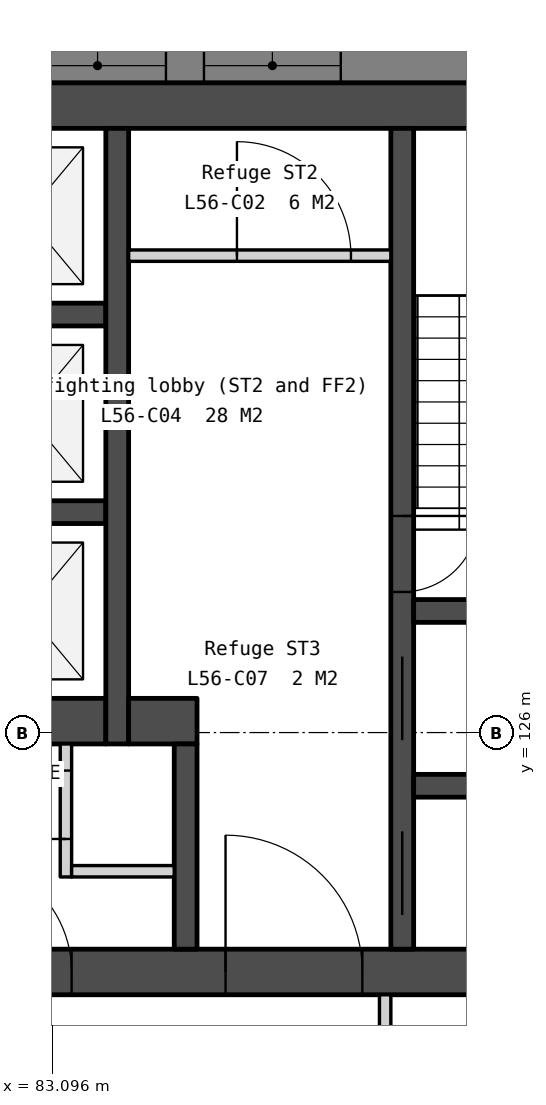
"""IFC4 building model, lengths in metres.
Left out: names, types, materials, properties, quantities, classifications, styles, units other than length and angle.
Written with IfcOpenShell. Run it as: python <this file> out.ifc"""

import sys

from ifc_helpers import new_model, si_unit, direction, frame, frame_2d, origin, place, context, subcontext, project, spatial, polyline, rectangle, outline, extrude, element, fill, save


model = new_model("IFC4")
c1 = context("Model", 3, precision=1e-05, world=origin(), true_north=direction((0.0, 1.0)))
c2 = subcontext(c1, "Body", "Model", "MODEL_VIEW")
j1 = project(units=[si_unit("LENGTHUNIT", "METRE"), si_unit("PLANEANGLEUNIT", "RADIAN")], contexts=[c1])
p1 = place(None, origin())
s1 = spatial("IfcSite", under=j1, at=p1, CompositionType="ELEMENT")
p2 = place(p1, origin())
s2 = spatial("IfcBuilding", under=s1, at=p2, CompositionType="ELEMENT")
p3 = place(p2, frame((0.0, 0.0, 223.1)))
s3 = spatial("IfcBuildingStorey", under=s2, at=p3, CompositionType="ELEMENT", Elevation=223.1)
p4 = place(p3, frame((69.0, 134.25, 0.0), z_axis=(0.0, 0.0, 1.0), x_axis=(1.0, 0.0, 0.0)))
e1 = element("IfcWall", 1, at=p4, inside=s3, PredefinedType="SOLIDWALL", context=c2, shape_type="SweptSolid", body=[
    extrude(rectangle(XDim=22.0, YDim=0.6, at=frame_2d((11.0, 0.0))), origin(), (0.0, 0.0, 1.0), 3.6),
])
p5 = place(p3, frame((69.0, 122.85, 0.0), z_axis=(0.0, 0.0, 1.0), x_axis=(1.0, 0.0, 0.0)))
e2 = element("IfcWall", 2, at=p5, inside=s3, PredefinedType="SOLIDWALL", context=c2, shape_type="SweptSolid", body=[
    extrude(rectangle(XDim=22.0, YDim=0.6, at=frame_2d((11.0, 0.0))), origin(), (0.0, 0.0, 1.0), 3.6),
])
p6 = place(p5, frame((16.375, 0.0, 0.0)))
e3 = element("IfcOpeningElement", 3, at=p6, cuts=e2, PredefinedType="OPENING", context=c2, shape_type="SweptSolid", body=[
    extrude(rectangle(XDim=1.8, YDim=2.1, at=frame_2d((0.9, 1.05))), frame((0.0, 0.31, 0.0), z_axis=(0.0, -1.0, 0.0), x_axis=(1.0, 0.0, 0.0)), (0.0, 0.0, 1.0), 0.62),
])
p7 = place(p5, frame((3.825, 0.0, 0.0)))
e4 = element("IfcOpeningElement", 4, at=p7, cuts=e2, PredefinedType="OPENING", context=c2, shape_type="SweptSolid", body=[
    extrude(rectangle(XDim=1.8, YDim=2.1, at=frame_2d((0.9, 1.05))), frame((0.0, 0.31, 0.0), z_axis=(0.0, -1.0, 0.0), x_axis=(1.0, 0.0, 0.0)), (0.0, 0.0, 1.0), 0.62),
])
p8 = place(p5, frame((12.85, 0.0, 0.0)))
e5 = element("IfcOpeningElement", 5, at=p8, cuts=e2, PredefinedType="OPENING", context=c2, shape_type="SweptSolid", body=[
    extrude(rectangle(XDim=1.5, YDim=2.1, at=frame_2d((0.75, 1.05))), frame((0.0, 0.31, 0.0), z_axis=(0.0, -1.0, 0.0), x_axis=(1.0, 0.0, 0.0)), (0.0, 0.0, 1.0), 0.62),
])
for number, where, z_axis, x_axis in (
    (6, (81.7, 131.5, 0.0), (0.0, 0.0, 1.0), (1.0, 0.0, 0.0)),
    (7, (81.7, 128.9, 0.0), (0.0, 0.0, 1.0), (1.0, 0.0, 0.0)),
):
    element("IfcWall", number, at=place(p3, frame(where, z_axis=z_axis, x_axis=x_axis)), inside=s3, PredefinedType="SOLIDWALL", context=c2, shape_type="SweptSolid", body=[
        extrude(rectangle(XDim=2.1, YDim=0.3, at=frame_2d((1.05, 0.0))), origin(), (0.0, 0.0, 1.0), 3.6),
    ])
p9 = place(p3, frame((82.9, 126.15, 0.0), z_axis=(0.0, 0.0, 1.0), x_axis=(1.0, 0.0, 0.0)))
e8 = element("IfcWall", 8, at=p9, inside=s3, PredefinedType="SOLIDWALL", context=c2, shape_type="SweptSolid", body=[
    extrude(rectangle(XDim=0.9, YDim=0.6, at=frame_2d((0.45, 0.0))), origin(), (0.0, 0.0, 1.0), 3.6),
])
p10 = place(p3, frame((83.275, 125.85, 0.0), z_axis=(0.0, 0.0, 1.0), x_axis=(0.0, -1.0, 0.0)))
e9 = element("IfcWall", 9, at=p10, inside=s3, PredefinedType="PARTITIONING", context=c2, shape_type="SweptSolid", body=[
    extrude(rectangle(XDim=1.75, YDim=0.15, at=frame_2d((0.875, 0.0))), origin(), (0.0, 0.0, 1.0), 3.6),
])
p11 = place(p10, frame((0.35, 0.0, 0.0)))
e10 = element("IfcOpeningElement", 10, at=p11, cuts=e9, PredefinedType="OPENING", context=c2, shape_type="SweptSolid", body=[
    extrude(rectangle(XDim=0.9, YDim=2.1, at=frame_2d((0.45, 1.05))), frame((0.0, 0.085, 0.0), z_axis=(0.0, -1.0, 0.0), x_axis=(1.0, 0.0, 0.0)), (0.0, 0.0, 1.0), 0.17),
])
p12 = place(p3, frame((83.35, 124.175, 0.0), z_axis=(0.0, 0.0, 1.0), x_axis=(1.0, 0.0, 0.0)))
e11 = element("IfcWall", 11, at=p12, inside=s3, PredefinedType="PARTITIONING", context=c2, shape_type="SweptSolid", body=[
    extrude(rectangle(XDim=1.35, YDim=0.15, at=frame_2d((0.675, 0.0))), origin(), (0.0, 0.0, 1.0), 3.6),
])
p13 = place(p3, frame((83.95, 133.95, 0.0), z_axis=(0.0, 0.0, 1.0), x_axis=(0.0, -1.0, 0.0)))
e12 = element("IfcWall", 12, at=p13, inside=s3, PredefinedType="SOLIDWALL", context=c2, shape_type="SweptSolid", body=[
    extrude(rectangle(XDim=8.1, YDim=0.3, at=frame_2d((4.05, 0.0))), origin(), (0.0, 0.0, 1.0), 3.6),
])
p14 = place(p3, frame((84.1, 132.275, 0.0), z_axis=(0.0, 0.0, 1.0), x_axis=(1.0, 0.0, 0.0)))
e13 = element("IfcWall", 13, at=p14, inside=s3, PredefinedType="PARTITIONING", context=c2, shape_type="SweptSolid", body=[
    extrude(rectangle(XDim=3.45, YDim=0.15, at=frame_2d((1.725, 0.0))), origin(), (0.0, 0.0, 1.0), 3.6),
])
p15 = place(p14, frame((1.425, 0.0, 0.0)))
e14 = element("IfcOpeningElement", 14, at=p15, cuts=e13, PredefinedType="OPENING", context=c2, shape_type="SweptSolid", body=[
    extrude(rectangle(XDim=1.5, YDim=2.1, at=frame_2d((0.75, 1.05))), frame((0.0, 0.085, 0.0), z_axis=(0.0, -1.0, 0.0), x_axis=(1.0, 0.0, 0.0)), (0.0, 0.0, 1.0), 0.17),
])
p16 = place(p3, frame((84.1, 126.15, 0.0), z_axis=(0.0, 0.0, 1.0), x_axis=(1.0, 0.0, 0.0)))
e15 = element("IfcWall", 15, at=p16, inside=s3, PredefinedType="SOLIDWALL", context=c2, shape_type="SweptSolid", body=[
    extrude(rectangle(XDim=0.9, YDim=0.6, at=frame_2d((0.45, 0.0))), origin(), (0.0, 0.0, 1.0), 3.6),
])
p17 = place(p3, frame((84.85, 125.85, 0.0), z_axis=(0.0, 0.0, 1.0), x_axis=(0.0, -1.0, 0.0)))
e16 = element("IfcWall", 16, at=p17, inside=s3, PredefinedType="SOLIDWALL", context=c2, shape_type="SweptSolid", body=[
    extrude(rectangle(XDim=2.7, YDim=0.3, at=frame_2d((1.35, 0.0))), origin(), (0.0, 0.0, 1.0), 3.6),
])
p18 = place(p3, frame((87.7, 133.95, 0.0), z_axis=(0.0, 0.0, 1.0), x_axis=(0.0, -1.0, 0.0)))
e17 = element("IfcWall", 17, at=p18, inside=s3, PredefinedType="SOLIDWALL", context=c2, shape_type="SweptSolid", body=[
    extrude(rectangle(XDim=10.8, YDim=0.3, at=frame_2d((5.4, 0.0))), origin(), (0.0, 0.0, 1.0), 3.6),
])
p19 = place(p18, frame((6.95, 0.0, 0.0)))
e18 = element("IfcOpeningElement", 18, at=p19, cuts=e17, PredefinedType="OPENING", context=c2, shape_type="SweptSolid", body=[
    extrude(rectangle(XDim=1.1, YDim=2.1, at=frame_2d((0.55, 1.05))), frame((0.0, 0.16, 0.0), z_axis=(0.0, -1.0, 0.0), x_axis=(1.0, 0.0, 0.0)), (0.0, 0.0, 1.0), 0.32),
])
p20 = place(p18, frame((5.1, 0.0, 0.0)))
e19 = element("IfcOpeningElement", 19, at=p20, cuts=e17, PredefinedType="OPENING", context=c2, shape_type="SweptSolid", body=[
    extrude(rectangle(XDim=1.0, YDim=2.1, at=frame_2d((0.5, 1.05))), frame((0.0, 0.16, 0.0), z_axis=(0.0, -1.0, 0.0), x_axis=(1.0, 0.0, 0.0)), (0.0, 0.0, 1.0), 0.32),
])
p21 = place(p18, frame((9.25, 0.0, 0.0)))
e20 = element("IfcOpeningElement", 20, at=p21, cuts=e17, PredefinedType="OPENING", context=c2, shape_type="SweptSolid", body=[
    extrude(rectangle(XDim=1.1, YDim=2.1, at=frame_2d((0.55, 1.05))), frame((0.0, 0.16, 0.0), z_axis=(0.0, -1.0, 0.0), x_axis=(1.0, 0.0, 0.0)), (0.0, 0.0, 1.0), 0.32),
])
for number, where, z_axis, x_axis in (
    (21, (87.85, 127.6, 0.0), (0.0, 0.0, 1.0), (1.0, 0.0, 0.0)),
    (22, (87.85, 125.3, 0.0), (0.0, 0.0, 1.0), (1.0, 0.0, 0.0)),
):
    element("IfcWall", number, at=place(p3, frame(where, z_axis=z_axis, x_axis=x_axis)), inside=s3, PredefinedType="SOLIDWALL", context=c2, shape_type="SweptSolid", body=[
        extrude(rectangle(XDim=2.55, YDim=0.3, at=frame_2d((1.275, 0.0))), origin(), (0.0, 0.0, 1.0), 3.6),
    ])
p22 = place(p3, frame((99.365, 134.775, -0.15), z_axis=(0.0, 0.0, 1.0), x_axis=(-1.0, 0.0, 0.0)))
e23 = element("IfcWall", 23, at=p22, inside=s3, PredefinedType="SOLIDWALL", context=c2, shape_type="SweptSolid", body=[
    extrude(outline(polyline([(38.729, 0.0), (38.729, 3.75), (0.0, 3.75), (0.0, 0.0), (38.729, 0.0)])), frame((0.0, 0.225, 0.0), z_axis=(0.0, -1.0, 0.0), x_axis=(1.0, 0.0, 0.0)), (0.0, 0.0, 1.0), 0.45),
])
p23 = place(p22, frame((2.791, 0.0, 0.95)))
e24 = element("IfcOpeningElement", 24, at=p23, cuts=e23, PredefinedType="OPENING", context=c2, shape_type="SweptSolid", body=[
    extrude(rectangle(XDim=1.8, YDim=2.2, at=frame_2d((0.9, 1.1))), frame((0.0, 0.235, 0.0), z_axis=(0.0, -1.0, 0.0), x_axis=(1.0, 0.0, 0.0)), (0.0, 0.0, 1.0), 0.47),
])
p24 = place(p22, frame((5.091, 0.0, 0.95)))
e25 = element("IfcOpeningElement", 25, at=p24, cuts=e23, PredefinedType="OPENING", context=c2, shape_type="SweptSolid", body=[
    extrude(rectangle(XDim=1.8, YDim=2.2, at=frame_2d((0.9, 1.1))), frame((0.0, 0.235, 0.0), z_axis=(0.0, -1.0, 0.0), x_axis=(1.0, 0.0, 0.0)), (0.0, 0.0, 1.0), 0.47),
])
p25 = place(p22, frame((12.473, 0.0, 0.95)))
e26 = element("IfcOpeningElement", 26, at=p25, cuts=e23, PredefinedType="OPENING", context=c2, shape_type="SweptSolid", body=[
    extrude(rectangle(XDim=1.8, YDim=2.2, at=frame_2d((0.9, 1.1))), frame((0.0, 0.235, 0.0), z_axis=(0.0, -1.0, 0.0), x_axis=(1.0, 0.0, 0.0)), (0.0, 0.0, 1.0), 0.47),
])
p26 = place(p22, frame((14.773, 0.0, 0.95)))
e27 = element("IfcOpeningElement", 27, at=p26, cuts=e23, PredefinedType="OPENING", context=c2, shape_type="SweptSolid", body=[
    extrude(rectangle(XDim=1.8, YDim=2.2, at=frame_2d((0.9, 1.1))), frame((0.0, 0.235, 0.0), z_axis=(0.0, -1.0, 0.0), x_axis=(1.0, 0.0, 0.0)), (0.0, 0.0, 1.0), 0.47),
])
p27 = place(p22, frame((22.156, 0.0, 0.95)))
e28 = element("IfcOpeningElement", 28, at=p27, cuts=e23, PredefinedType="OPENING", context=c2, shape_type="SweptSolid", body=[
    extrude(rectangle(XDim=1.8, YDim=2.2, at=frame_2d((0.9, 1.1))), frame((0.0, 0.235, 0.0), z_axis=(0.0, -1.0, 0.0), x_axis=(1.0, 0.0, 0.0)), (0.0, 0.0, 1.0), 0.47),
])
p28 = place(p22, frame((24.456, 0.0, 0.95)))
e29 = element("IfcOpeningElement", 29, at=p28, cuts=e23, PredefinedType="OPENING", context=c2, shape_type="SweptSolid", body=[
    extrude(rectangle(XDim=1.8, YDim=2.2, at=frame_2d((0.9, 1.1))), frame((0.0, 0.235, 0.0), z_axis=(0.0, -1.0, 0.0), x_axis=(1.0, 0.0, 0.0)), (0.0, 0.0, 1.0), 0.47),
])
p29 = place(p22, frame((31.838, 0.0, 0.95)))
e30 = element("IfcOpeningElement", 30, at=p29, cuts=e23, PredefinedType="OPENING", context=c2, shape_type="SweptSolid", body=[
    extrude(rectangle(XDim=1.8, YDim=2.2, at=frame_2d((0.9, 1.1))), frame((0.0, 0.235, 0.0), z_axis=(0.0, -1.0, 0.0), x_axis=(1.0, 0.0, 0.0)), (0.0, 0.0, 1.0), 0.47),
])
p30 = place(p22, frame((34.138, 0.0, 0.95)))
e31 = element("IfcOpeningElement", 31, at=p30, cuts=e23, PredefinedType="OPENING", context=c2, shape_type="SweptSolid", body=[
    extrude(rectangle(XDim=1.8, YDim=2.2, at=frame_2d((0.9, 1.1))), frame((0.0, 0.235, 0.0), z_axis=(0.0, -1.0, 0.0), x_axis=(1.0, 0.0, 0.0)), (0.0, 0.0, 1.0), 0.47),
])
p31 = place(p3, frame((81.505, 98.627, -0.15), z_axis=(0.0, 0.0, 1.0), x_axis=(0.500002199942, 0.866024133644, 0.0)))
e32 = element("IfcWall", 32, at=p31, inside=s3, PredefinedType="SOLIDWALL", context=c2, shape_type="SweptSolid", body=[
    extrude(outline(polyline([(38.729, 0.0), (38.729, 3.75), (0.0, 3.75), (0.0, 0.0), (38.729, 0.0)])), frame((0.0, 0.225, 0.0), z_axis=(0.0, -1.0, 0.0), x_axis=(1.0, 0.0, 0.0)), (0.0, 0.0, 1.0), 0.45),
])
p32 = place(p31, frame((2.791, 0.0, 0.95)))
e33 = element("IfcOpeningElement", 33, at=p32, cuts=e32, PredefinedType="OPENING", context=c2, shape_type="SweptSolid", body=[
    extrude(rectangle(XDim=1.8, YDim=2.2, at=frame_2d((0.9, 1.1))), frame((0.0, 0.235, 0.0), z_axis=(0.0, -1.0, 0.0), x_axis=(1.0, 0.0, 0.0)), (0.0, 0.0, 1.0), 0.47),
])
p33 = place(p31, frame((5.091, 0.0, 0.95)))
e34 = element("IfcOpeningElement", 34, at=p33, cuts=e32, PredefinedType="OPENING", context=c2, shape_type="SweptSolid", body=[
    extrude(rectangle(XDim=1.8, YDim=2.2, at=frame_2d((0.9, 1.1))), frame((0.0, 0.235, 0.0), z_axis=(0.0, -1.0, 0.0), x_axis=(1.0, 0.0, 0.0)), (0.0, 0.0, 1.0), 0.47),
])
p34 = place(p31, frame((12.473, 0.0, 0.95)))
e35 = element("IfcOpeningElement", 35, at=p34, cuts=e32, PredefinedType="OPENING", context=c2, shape_type="SweptSolid", body=[
    extrude(rectangle(XDim=1.8, YDim=2.2, at=frame_2d((0.9, 1.1))), frame((0.0, 0.235, 0.0), z_axis=(0.0, -1.0, 0.0), x_axis=(1.0, 0.0, 0.0)), (0.0, 0.0, 1.0), 0.47),
])
p35 = place(p31, frame((14.773, 0.0, 0.95)))
e36 = element("IfcOpeningElement", 36, at=p35, cuts=e32, PredefinedType="OPENING", context=c2, shape_type="SweptSolid", body=[
    extrude(rectangle(XDim=1.8, YDim=2.2, at=frame_2d((0.9, 1.1))), frame((0.0, 0.235, 0.0), z_axis=(0.0, -1.0, 0.0), x_axis=(1.0, 0.0, 0.0)), (0.0, 0.0, 1.0), 0.47),
])
p36 = place(p31, frame((22.156, 0.0, 0.95)))
e37 = element("IfcOpeningElement", 37, at=p36, cuts=e32, PredefinedType="OPENING", context=c2, shape_type="SweptSolid", body=[
    extrude(rectangle(XDim=1.8, YDim=2.2, at=frame_2d((0.9, 1.1))), frame((0.0, 0.235, 0.0), z_axis=(0.0, -1.0, 0.0), x_axis=(1.0, 0.0, 0.0)), (0.0, 0.0, 1.0), 0.47),
])
p37 = place(p31, frame((24.456, 0.0, 0.95)))
e38 = element("IfcOpeningElement", 38, at=p37, cuts=e32, PredefinedType="OPENING", context=c2, shape_type="SweptSolid", body=[
    extrude(rectangle(XDim=1.8, YDim=2.2, at=frame_2d((0.9, 1.1))), frame((0.0, 0.235, 0.0), z_axis=(0.0, -1.0, 0.0), x_axis=(1.0, 0.0, 0.0)), (0.0, 0.0, 1.0), 0.47),
])
p38 = place(p31, frame((31.838, 0.0, 0.95)))
e39 = element("IfcOpeningElement", 39, at=p38, cuts=e32, PredefinedType="OPENING", context=c2, shape_type="SweptSolid", body=[
    extrude(rectangle(XDim=1.8, YDim=2.2, at=frame_2d((0.9, 1.1))), frame((0.0, 0.235, 0.0), z_axis=(0.0, -1.0, 0.0), x_axis=(1.0, 0.0, 0.0)), (0.0, 0.0, 1.0), 0.47),
])
p39 = place(p31, frame((34.138, 0.0, 0.95)))
e40 = element("IfcOpeningElement", 40, at=p39, cuts=e32, PredefinedType="OPENING", context=c2, shape_type="SweptSolid", body=[
    extrude(rectangle(XDim=1.8, YDim=2.2, at=frame_2d((0.9, 1.1))), frame((0.0, 0.235, 0.0), z_axis=(0.0, -1.0, 0.0), x_axis=(1.0, 0.0, 0.0)), (0.0, 0.0, 1.0), 0.47),
])
p40 = place(p3, frame((87.475, 120.025, 0.0), z_axis=(0.0, 0.0, 1.0), x_axis=(9.6683747e-05, 0.999999995326, 0.0)))
e41 = element("IfcWall", 41, at=p40, inside=s3, PredefinedType="PARTITIONING", context=c2, shape_type="SweptSolid", body=[
    extrude(rectangle(XDim=2.525, YDim=0.15, at=frame_2d((1.263, 0.0))), origin(), (0.0, 0.0, 1.0), 3.6),
])
p41 = place(p19, origin())
e42 = element("IfcDoor", 42, at=p41, inside=s3, OperationType="SLIDING_TO_LEFT", PredefinedType="DOOR", context=c2, shape_type="SweptSolid", body=[
    extrude(rectangle(XDim=1.1, YDim=2.1, at=frame_2d((0.55, 1.05))), frame((0.0, 0.025, 0.0), z_axis=(0.0, -1.0, 0.0), x_axis=(1.0, 0.0, 0.0)), (0.0, 0.0, 1.0), 0.05),
])
fill(e18, e42)
p42 = place(p6, origin())
e43 = element("IfcDoor", 43, at=p42, inside=s3, OperationType="DOUBLE_DOOR_DOUBLE_SWING", PredefinedType="DOOR", context=c2, shape_type="SweptSolid", body=[
    extrude(rectangle(XDim=1.8, YDim=2.1, at=frame_2d((0.9, 1.05))), frame((0.0, 0.025, 0.0), z_axis=(0.0, -1.0, 0.0), x_axis=(1.0, 0.0, 0.0)), (0.0, 0.0, 1.0), 0.05),
])
fill(e3, e43)
p43 = place(p8, origin())
e44 = element("IfcDoor", 44, at=p43, inside=s3, OperationType="DOUBLE_DOOR_DOUBLE_SWING", PredefinedType="DOOR", context=c2, shape_type="SweptSolid", body=[
    extrude(rectangle(XDim=1.5, YDim=2.1, at=frame_2d((0.75, 1.05))), frame((0.0, 0.025, 0.0), z_axis=(0.0, -1.0, 0.0), x_axis=(1.0, 0.0, 0.0)), (0.0, 0.0, 1.0), 0.05),
])
fill(e5, e44)
p44 = place(p11, origin())
e45 = element("IfcDoor", 45, at=p44, inside=s3, OperationType="SINGLE_SWING_RIGHT", PredefinedType="DOOR", context=c2, shape_type="SweptSolid", body=[
    extrude(rectangle(XDim=0.9, YDim=2.1, at=frame_2d((0.45, 1.05))), frame((0.0, 0.025, 0.0), z_axis=(0.0, -1.0, 0.0), x_axis=(1.0, 0.0, 0.0)), (0.0, 0.0, 1.0), 0.05),
])
fill(e10, e45)
p45 = place(p15, origin())
e46 = element("IfcDoor", 46, at=p45, inside=s3, OperationType="DOUBLE_DOOR_DOUBLE_SWING", PredefinedType="DOOR", context=c2, shape_type="SweptSolid", body=[
    extrude(rectangle(XDim=1.5, YDim=2.1, at=frame_2d((0.75, 1.05))), frame((0.0, 0.025, 0.0), z_axis=(0.0, -1.0, 0.0), x_axis=(1.0, 0.0, 0.0)), (0.0, 0.0, 1.0), 0.05),
])
fill(e14, e46)
p46 = place(p20, origin())
e47 = element("IfcDoor", 47, at=p46, inside=s3, OperationType="SINGLE_SWING_LEFT", PredefinedType="DOOR", context=c2, shape_type="SweptSolid", body=[
    extrude(rectangle(XDim=1.0, YDim=2.1, at=frame_2d((0.5, 1.05))), frame((0.0, 0.025, 0.0), z_axis=(0.0, -1.0, 0.0), x_axis=(1.0, 0.0, 0.0)), (0.0, 0.0, 1.0), 0.05),
])
fill(e19, e47)
p47 = place(p21, origin())
e48 = element("IfcDoor", 48, at=p47, inside=s3, OperationType="SLIDING_TO_LEFT", PredefinedType="DOOR", context=c2, shape_type="SweptSolid", body=[
    extrude(rectangle(XDim=1.1, YDim=2.1, at=frame_2d((0.55, 1.05))), frame((0.0, 0.025, 0.0), z_axis=(0.0, -1.0, 0.0), x_axis=(1.0, 0.0, 0.0)), (0.0, 0.0, 1.0), 0.05),
])
fill(e20, e48)
p48 = place(p25, origin())
e49 = element("IfcWindow", 49, at=p48, inside=s3, PartitioningType="SINGLE_PANEL", PredefinedType="WINDOW", context=c2, shape_type="SweptSolid", body=[
    extrude(rectangle(XDim=1.8, YDim=2.2, at=frame_2d((0.9, 1.1))), frame((0.0, 0.03, 0.0), z_axis=(0.0, -1.0, 0.0), x_axis=(1.0, 0.0, 0.0)), (0.0, 0.0, 1.0), 0.06),
])
fill(e26, e49)
p49 = place(p26, origin())
e50 = element("IfcWindow", 50, at=p49, inside=s3, PartitioningType="SINGLE_PANEL", PredefinedType="WINDOW", context=c2, shape_type="SweptSolid", body=[
    extrude(rectangle(XDim=1.8, YDim=2.2, at=frame_2d((0.9, 1.1))), frame((0.0, 0.03, 0.0), z_axis=(0.0, -1.0, 0.0), x_axis=(1.0, 0.0, 0.0)), (0.0, 0.0, 1.0), 0.06),
])
fill(e27, e50)
save(model, sys.argv[1])
